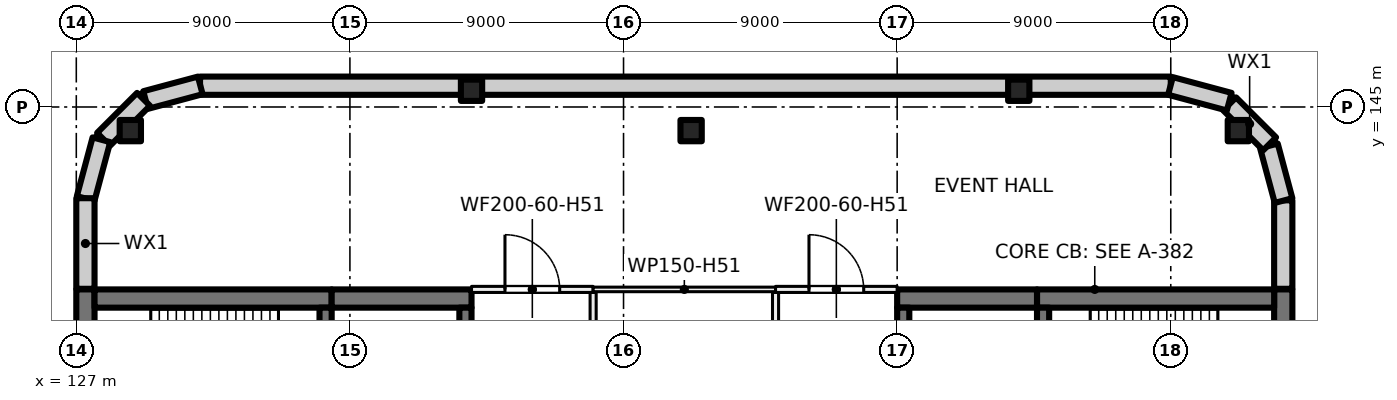
"""IFC4 building model, lengths in metres.
Left out: names, types, materials, properties, quantities, classifications, styles, units other than length and angle.
Written with IfcOpenShell. Run it as: python <this file> out.ifc"""

import sys

from ifc_helpers import new_model, si_unit, direction, frame, frame_2d, origin, origin_2d, place, context, subcontext, project, spatial, rectangle, extrude, element, fill, save


model = new_model("IFC4")
c1 = context("Model", 3, precision=1e-05, world=origin(), true_north=direction((0.0, 1.0)))
c2 = subcontext(c1, "Body", "Model", "MODEL_VIEW")
j1 = project(units=[si_unit("LENGTHUNIT", "METRE"), si_unit("PLANEANGLEUNIT", "RADIAN")], contexts=[c1])
p1 = place(None, origin())
s1 = spatial("IfcSite", under=j1, at=p1, CompositionType="ELEMENT")
p2 = place(p1, origin())
s2 = spatial("IfcBuilding", under=s1, at=p2, CompositionType="ELEMENT")
p3 = place(p2, frame((0.0, 0.0, 75.5)))
s3 = spatial("IfcBuildingStorey", under=s2, at=p3, CompositionType="ELEMENT", Elevation=75.5)
for number, where, z_axis, x_axis in (
    (1, (128.777, 144.223, 0.0), (0.0, 0.0, 1.0), (1.0, 0.0, 0.0)),
    (2, (140.0, 145.55, 0.0), (0.0, 0.0, 1.0), (1.0, 0.0, 0.0)),
    (3, (147.223, 144.223, 0.0), (0.0, 0.0, 1.0), (1.0, 0.0, 0.0)),
    (4, (165.223, 144.223, 0.0), (0.0, 0.0, 1.0), (1.0, 0.0, 0.0)),
    (5, (158.0, 145.55, 0.0), (0.0, 0.0, 1.0), (1.0, 0.0, 0.0)),
):
    element("IfcColumn", number, at=place(p3, frame(where, z_axis=z_axis, x_axis=x_axis)), inside=s3, PredefinedType="COLUMN", context=c2, shape_type="SweptSolid", body=[
        extrude(rectangle(XDim=0.7, YDim=0.7, at=origin_2d()), origin(), (0.0, 0.0, 1.0), 5.5),
    ])
p4 = place(p3, frame((127.3, 135.2, 0.0), z_axis=(0.0, 0.0, 1.0), x_axis=(0.0, 1.0, 0.0)))
e6 = element("IfcWall", 6, at=p4, inside=s3, PredefinedType="SHEAR", context=c2, shape_type="SweptSolid", body=[
    extrude(rectangle(XDim=3.8, YDim=0.6, at=frame_2d((1.9, 0.0))), origin(), (0.0, 0.0, 1.0), 5.5),
])
p5 = place(p3, frame((127.6, 138.7, 0.0), z_axis=(0.0, 0.0, 1.0), x_axis=(1.0, 0.0, 0.0)))
e7 = element("IfcWall", 7, at=p5, inside=s3, PredefinedType="SHEAR", context=c2, shape_type="SweptSolid", body=[
    extrude(rectangle(XDim=7.8, YDim=0.6, at=frame_2d((3.9, 0.0))), origin(), (0.0, 0.0, 1.0), 5.5),
])
p6 = place(p3, frame((135.4, 138.7, 0.0), z_axis=(0.0, 0.0, 1.0), x_axis=(1.0, 0.0, 0.0)))
e8 = element("IfcWall", 8, at=p6, inside=s3, PredefinedType="SHEAR", context=c2, shape_type="SweptSolid", body=[
    extrude(rectangle(XDim=4.6, YDim=0.6, at=frame_2d((2.3, 0.0))), origin(), (0.0, 0.0, 1.0), 5.5),
])
p7 = place(p3, frame((135.2, 135.6, 0.0), z_axis=(0.0, 0.0, 1.0), x_axis=(0.0, 1.0, 0.0)))
e9 = element("IfcWall", 9, at=p7, inside=s3, PredefinedType="SHEAR", context=c2, shape_type="SweptSolid", body=[
    extrude(rectangle(XDim=2.8, YDim=0.4, at=frame_2d((1.4, 0.0))), origin(), (0.0, 0.0, 1.0), 5.5),
])
p8 = place(p7, frame((0.9, 0.0, 0.0)))
e10 = element("IfcOpeningElement", 10, at=p8, cuts=e9, PredefinedType="OPENING", context=c2, shape_type="SweptSolid", body=[
    extrude(rectangle(XDim=1.0, YDim=2.1, at=frame_2d((0.5, 1.05))), frame((0.0, 0.21, 0.0), z_axis=(0.0, -1.0, 0.0), x_axis=(1.0, 0.0, 0.0)), (0.0, 0.0, 1.0), 0.42),
])
p9 = place(p3, frame((139.8, 129.8, 0.0), z_axis=(0.0, 0.0, 1.0), x_axis=(0.0, 1.0, 0.0)))
e11 = element("IfcWall", 11, at=p9, inside=s3, PredefinedType="SHEAR", context=c2, shape_type="SweptSolid", body=[
    extrude(rectangle(XDim=8.6, YDim=0.4, at=frame_2d((4.3, 0.0))), origin(), (0.0, 0.0, 1.0), 5.5),
])
p10 = place(p3, frame((166.7, 139.0, 0.0), z_axis=(0.0, 0.0, 1.0), x_axis=(0.0, -1.0, 0.0)))
e12 = element("IfcWall", 12, at=p10, inside=s3, PredefinedType="SHEAR", context=c2, shape_type="SweptSolid", body=[
    extrude(rectangle(XDim=3.8, YDim=0.6, at=frame_2d((1.9, 0.0))), origin(), (0.0, 0.0, 1.0), 5.5),
])
p11 = place(p3, frame((166.4, 138.7, 0.0), z_axis=(0.0, 0.0, 1.0), x_axis=(-1.0, 0.0, 0.0)))
e13 = element("IfcWall", 13, at=p11, inside=s3, PredefinedType="SHEAR", context=c2, shape_type="SweptSolid", body=[
    extrude(rectangle(XDim=7.8, YDim=0.6, at=frame_2d((3.9, 0.0))), origin(), (0.0, 0.0, 1.0), 5.5),
])
p12 = place(p3, frame((158.6, 138.7, 0.0), z_axis=(0.0, 0.0, 1.0), x_axis=(-1.0, 0.0, 0.0)))
e14 = element("IfcWall", 14, at=p12, inside=s3, PredefinedType="SHEAR", context=c2, shape_type="SweptSolid", body=[
    extrude(rectangle(XDim=4.6, YDim=0.6, at=frame_2d((2.3, 0.0))), origin(), (0.0, 0.0, 1.0), 5.5),
])
p13 = place(p3, frame((158.8, 138.4, 0.0), z_axis=(0.0, 0.0, 1.0), x_axis=(0.0, -1.0, 0.0)))
e15 = element("IfcWall", 15, at=p13, inside=s3, PredefinedType="SHEAR", context=c2, shape_type="SweptSolid", body=[
    extrude(rectangle(XDim=2.8, YDim=0.4, at=frame_2d((1.4, 0.0))), origin(), (0.0, 0.0, 1.0), 5.5),
])
p14 = place(p13, frame((0.9, 0.0, 0.0)))
e16 = element("IfcOpeningElement", 16, at=p14, cuts=e15, PredefinedType="OPENING", context=c2, shape_type="SweptSolid", body=[
    extrude(rectangle(XDim=1.0, YDim=2.1, at=frame_2d((0.5, 1.05))), frame((0.0, 0.21, 0.0), z_axis=(0.0, -1.0, 0.0), x_axis=(1.0, 0.0, 0.0)), (0.0, 0.0, 1.0), 0.42),
])
p15 = place(p3, frame((154.2, 138.4, 0.0), z_axis=(0.0, 0.0, 1.0), x_axis=(0.0, -1.0, 0.0)))
e17 = element("IfcWall", 17, at=p15, inside=s3, PredefinedType="SHEAR", context=c2, shape_type="SweptSolid", body=[
    extrude(rectangle(XDim=8.6, YDim=0.4, at=frame_2d((4.3, 0.0))), origin(), (0.0, 0.0, 1.0), 5.5),
])
p16 = place(p3, frame((131.07, 145.7, 0.0), z_axis=(0.0, 0.0, 1.0), x_axis=(1.0, 0.0, 0.0)))
e18 = element("IfcWall", 18, at=p16, inside=s3, PredefinedType="SOLIDWALL", context=c2, shape_type="SweptSolid", body=[
    extrude(rectangle(XDim=31.93, YDim=0.6, at=frame_2d((15.965, 0.0))), origin(), (0.0, 0.0, 1.0), 5.125),
])
for number, where, z_axis, x_axis in (
    (19, (129.281, 145.229, 0.0), (0.0, 0.0, 1.0), (0.966, 0.259, 0.0)),
    (20, (127.896, 143.936, 0.0), (0.0, 0.0, 1.0), (0.707, 0.707, 0.0)),
):
    element("IfcWall", number, at=place(p3, frame(where, z_axis=z_axis, x_axis=x_axis)), inside=s3, PredefinedType="SOLIDWALL", context=c2, shape_type="SweptSolid", body=[
        extrude(rectangle(XDim=1.861, YDim=0.6, at=frame_2d((0.93, 0.0))), origin(), (0.0, 0.0, 1.0), 5.125),
    ])
p17 = place(p3, frame((127.308, 141.99, 0.0), z_axis=(0.0, 0.0, 1.0), x_axis=(0.258839784042, 0.965920269068, 0.0)))
e21 = element("IfcWall", 21, at=p17, inside=s3, PredefinedType="SOLIDWALL", context=c2, shape_type="SweptSolid", body=[
    extrude(rectangle(XDim=2.0, YDim=0.6, at=frame_2d((1.0, 0.0))), origin(), (0.0, 0.0, 1.0), 5.125),
])
p18 = place(p3, frame((127.3, 139.02, 0.0), z_axis=(0.0, 0.0, 1.0), x_axis=(0.0, 1.0, 0.0)))
e22 = element("IfcWall", 22, at=p18, inside=s3, PredefinedType="SOLIDWALL", context=c2, shape_type="SweptSolid", body=[
    extrude(rectangle(XDim=2.98, YDim=0.6, at=frame_2d((1.49, 0.0))), origin(), (0.0, 0.0, 1.0), 5.125),
])
p19 = place(p3, frame((166.7, 141.93, 0.0), z_axis=(0.0, 0.0, 1.0), x_axis=(0.0, -1.0, 0.0)))
e23 = element("IfcWall", 23, at=p19, inside=s3, PredefinedType="SOLIDWALL", context=c2, shape_type="SweptSolid", body=[
    extrude(rectangle(XDim=2.91, YDim=0.6, at=frame_2d((1.455, 0.0))), origin(), (0.0, 0.0, 1.0), 5.125),
])
for number, where, z_axis, x_axis in (
    (24, (166.229, 143.719, 0.0), (0.0, 0.0, 1.0), (0.259, -0.966, 0.0)),
    (25, (164.936, 145.104, 0.0), (0.0, 0.0, 1.0), (0.707, -0.707, 0.0)),
):
    element("IfcWall", number, at=place(p3, frame(where, z_axis=z_axis, x_axis=x_axis)), inside=s3, PredefinedType="SOLIDWALL", context=c2, shape_type="SweptSolid", body=[
        extrude(rectangle(XDim=1.861, YDim=0.6, at=frame_2d((0.93, 0.0))), origin(), (0.0, 0.0, 1.0), 5.125),
    ])
p20 = place(p3, frame((162.99, 145.692, 0.0), z_axis=(0.0, 0.0, 1.0), x_axis=(0.965920269068, -0.258839784042, 0.0)))
e26 = element("IfcWall", 26, at=p20, inside=s3, PredefinedType="SOLIDWALL", context=c2, shape_type="SweptSolid", body=[
    extrude(rectangle(XDim=2.0, YDim=0.6, at=frame_2d((1.0, 0.0))), origin(), (0.0, 0.0, 1.0), 5.125),
])
p21 = place(p3, frame((140.0, 139.0, 0.0), z_axis=(0.0, 0.0, 1.0), x_axis=(1.0, 0.0, 0.0)))
e27 = element("IfcWall", 27, at=p21, inside=s3, PredefinedType="PARTITIONING", context=c2, shape_type="SweptSolid", body=[
    extrude(rectangle(XDim=4.0, YDim=0.2, at=frame_2d((2.0, 0.0))), origin(), (0.0, 0.0, 1.0), 5.125),
])
p22 = place(p21, frame((1.1, 0.0, 0.0)))
e28 = element("IfcOpeningElement", 28, at=p22, cuts=e27, PredefinedType="OPENING", context=c2, shape_type="SweptSolid", body=[
    extrude(rectangle(XDim=1.8, YDim=2.1, at=frame_2d((0.9, 1.05))), frame((0.0, 0.11, 0.0), z_axis=(0.0, -1.0, 0.0), x_axis=(1.0, 0.0, 0.0)), (0.0, 0.0, 1.0), 0.22),
])
p23 = place(p3, frame((144.0, 138.9, 0.0), z_axis=(0.0, 0.0, 1.0), x_axis=(0.0, -1.0, 0.0)))
e29 = element("IfcWall", 29, at=p23, inside=s3, PredefinedType="PARTITIONING", context=c2, shape_type="SweptSolid", body=[
    extrude(rectangle(XDim=21.8, YDim=0.2, at=frame_2d((10.9, 0.0))), origin(), (0.0, 0.0, 1.0), 5.125),
])
p24 = place(p23, frame((18.898, 0.0, 0.0)))
e30 = element("IfcOpeningElement", 30, at=p24, cuts=e29, PredefinedType="OPENING", context=c2, shape_type="SweptSolid", body=[
    extrude(rectangle(XDim=1.0, YDim=2.1, at=frame_2d((0.5, 1.05))), frame((0.0, 0.11, 0.0), z_axis=(0.0, -1.0, 0.0), x_axis=(1.0, 0.0, 0.0)), (0.0, 0.0, 1.0), 0.22),
])
p25 = place(p23, frame((7.502, 0.0, 0.0)))
e31 = element("IfcOpeningElement", 31, at=p25, cuts=e29, PredefinedType="OPENING", context=c2, shape_type="SweptSolid", body=[
    extrude(rectangle(XDim=1.8, YDim=2.1, at=frame_2d((0.9, 1.05))), frame((0.0, 0.11, 0.0), z_axis=(0.0, -1.0, 0.0), x_axis=(1.0, 0.0, 0.0)), (0.0, 0.0, 1.0), 0.22),
])
p26 = place(p3, frame((144.0, 139.0, 0.0), z_axis=(0.0, 0.0, 1.0), x_axis=(1.0, 0.0, 0.0)))
e32 = element("IfcWall", 32, at=p26, inside=s3, PredefinedType="PARTITIONING", context=c2, shape_type="SweptSolid", body=[
    extrude(rectangle(XDim=6.0, YDim=0.15, at=frame_2d((3.0, 0.0))), origin(), (0.0, 0.0, 1.0), 5.125),
])
p27 = place(p3, frame((150.0, 117.1, 0.0), z_axis=(0.0, 0.0, 1.0), x_axis=(0.0, 1.0, 0.0)))
e33 = element("IfcWall", 33, at=p27, inside=s3, PredefinedType="PARTITIONING", context=c2, shape_type="SweptSolid", body=[
    extrude(rectangle(XDim=21.8, YDim=0.2, at=frame_2d((10.9, 0.0))), origin(), (0.0, 0.0, 1.0), 5.125),
])
p28 = place(p27, frame((2.402, 0.0, 0.0)))
e34 = element("IfcOpeningElement", 34, at=p28, cuts=e33, PredefinedType="OPENING", context=c2, shape_type="SweptSolid", body=[
    extrude(rectangle(XDim=1.0, YDim=2.1, at=frame_2d((0.5, 1.05))), frame((0.0, 0.11, 0.0), z_axis=(0.0, -1.0, 0.0), x_axis=(1.0, 0.0, 0.0)), (0.0, 0.0, 1.0), 0.22),
])
p29 = place(p27, frame((12.498, 0.0, 0.0)))
e35 = element("IfcOpeningElement", 35, at=p29, cuts=e33, PredefinedType="OPENING", context=c2, shape_type="SweptSolid", body=[
    extrude(rectangle(XDim=1.8, YDim=2.1, at=frame_2d((0.9, 1.05))), frame((0.0, 0.11, 0.0), z_axis=(0.0, -1.0, 0.0), x_axis=(1.0, 0.0, 0.0)), (0.0, 0.0, 1.0), 0.22),
])
p30 = place(p3, frame((150.0, 139.0, 0.0), z_axis=(0.0, 0.0, 1.0), x_axis=(1.0, 0.0, 0.0)))
e36 = element("IfcWall", 36, at=p30, inside=s3, PredefinedType="PARTITIONING", context=c2, shape_type="SweptSolid", body=[
    extrude(rectangle(XDim=4.0, YDim=0.2, at=frame_2d((2.0, 0.0))), origin(), (0.0, 0.0, 1.0), 5.125),
])
p31 = place(p30, frame((1.1, 0.0, 0.0)))
e37 = element("IfcOpeningElement", 37, at=p31, cuts=e36, PredefinedType="OPENING", context=c2, shape_type="SweptSolid", body=[
    extrude(rectangle(XDim=1.8, YDim=2.1, at=frame_2d((0.9, 1.05))), frame((0.0, 0.11, 0.0), z_axis=(0.0, -1.0, 0.0), x_axis=(1.0, 0.0, 0.0)), (0.0, 0.0, 1.0), 0.22),
])
p32 = place(p22, origin())
e38 = element("IfcDoor", 38, at=p32, inside=s3, OperationType="DOUBLE_DOOR_SINGLE_SWING", PredefinedType="DOOR", context=c2, shape_type="SweptSolid", body=[
    extrude(rectangle(XDim=1.8, YDim=2.1, at=frame_2d((0.9, 1.05))), frame((0.0, 0.025, 0.0), z_axis=(0.0, -1.0, 0.0), x_axis=(1.0, 0.0, 0.0)), (0.0, 0.0, 1.0), 0.05),
])
fill(e28, e38)
p33 = place(p31, origin())
e39 = element("IfcDoor", 39, at=p33, inside=s3, OperationType="DOUBLE_DOOR_SINGLE_SWING", PredefinedType="DOOR", context=c2, shape_type="SweptSolid", body=[
    extrude(rectangle(XDim=1.8, YDim=2.1, at=frame_2d((0.9, 1.05))), frame((0.0, 0.025, 0.0), z_axis=(0.0, -1.0, 0.0), x_axis=(1.0, 0.0, 0.0)), (0.0, 0.0, 1.0), 0.05),
])
fill(e37, e39)
save(model, sys.argv[1])
